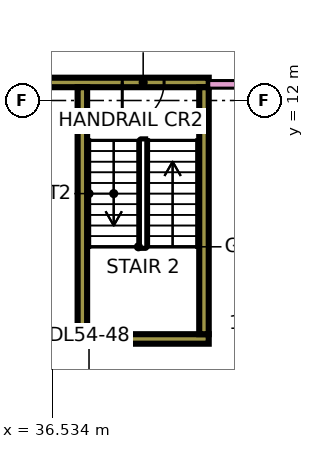
"""IFC4 building model, lengths in metres.
Left out: names, types, materials, properties, quantities, classifications, styles, units other than length and angle.
Written with IfcOpenShell. Run it as: python <this file> out.ifc"""

import sys

from ifc_helpers import new_model, si_unit, direction, frame, frame_2d, origin, place, context, subcontext, project, spatial, rectangle, extrude, element, fill, save


model = new_model("IFC4")
c1 = context("Model", 3, precision=1e-05, world=origin(), true_north=direction((0.0, 1.0)))
c2 = subcontext(c1, "Body", "Model", "MODEL_VIEW")
j1 = project(units=[si_unit("LENGTHUNIT", "METRE"), si_unit("PLANEANGLEUNIT", "RADIAN")], contexts=[c1])
p1 = place(None, origin())
s1 = spatial("IfcSite", under=j1, at=p1, CompositionType="ELEMENT")
p2 = place(p1, origin())
s2 = spatial("IfcBuilding", under=s1, at=p2, CompositionType="ELEMENT")
p3 = place(p2, frame((0.0, 0.0, 230.4)))
s3 = spatial("IfcBuildingStorey", under=s2, at=p3, CompositionType="ELEMENT", Elevation=230.4)
p4 = place(p3, frame((37.2, 5.725, 0.0), z_axis=(0.0, 0.0, 1.0), x_axis=(1.0, 0.0, 0.0)))
e1 = element("IfcWall", 1, at=p4, inside=s3, PredefinedType="SHEAR", context=c2, shape_type="SweptSolid", body=[
    extrude(rectangle(XDim=3.45, YDim=0.25, at=frame_2d((1.725, 0.0))), origin(), (0.0, 0.0, 1.0), 3.75),
])
p5 = place(p3, frame((36.425, 12.475, 0.0), z_axis=(0.0, 0.0, 1.0), x_axis=(1.0, 0.0, 0.0)))
e2 = element("IfcWall", 2, at=p5, inside=s3, PredefinedType="SHEAR", context=c2, shape_type="SweptSolid", body=[
    extrude(rectangle(XDim=4.225, YDim=0.25, at=frame_2d((2.112, 0.0))), origin(), (0.0, 0.0, 1.0), 3.75),
])
p6 = place(p5, frame((1.95, 0.0, 0.0)))
e3 = element("IfcOpeningElement", 3, at=p6, cuts=e2, PredefinedType="OPENING", context=c2, shape_type="SweptSolid", body=[
    extrude(rectangle(XDim=1.1, YDim=2.2, at=frame_2d((0.55, 1.1))), frame((0.0, 0.135, 0.0), z_axis=(0.0, -1.0, 0.0), x_axis=(1.0, 0.0, 0.0)), (0.0, 0.0, 1.0), 0.27),
])
for number, where, z_axis, x_axis in (
    (4, (37.325, 5.85, 0.0), (0.0, 0.0, 1.0), (0.0, 1.0, 0.0)),
    (5, (40.525, 5.85, 0.0), (0.0, 0.0, 1.0), (0.0, 1.0, 0.0)),
):
    element("IfcWall", number, at=place(p3, frame(where, z_axis=z_axis, x_axis=x_axis)), inside=s3, PredefinedType="SHEAR", context=c2, shape_type="SweptSolid", body=[
        extrude(rectangle(XDim=6.5, YDim=0.25, at=frame_2d((3.25, 0.0))), origin(), (0.0, 0.0, 1.0), 3.75),
    ])
p7 = place(p3, frame((40.65, 12.425, 0.0), z_axis=(0.0, 0.0, 1.0), x_axis=(1.0, 0.0, 0.0)))
e6 = element("IfcWall", 6, at=p7, inside=s3, PredefinedType="PARTITIONING", context=c2, shape_type="SweptSolid", body=[
    extrude(rectangle(XDim=22.276, YDim=0.2, at=frame_2d((11.138, 0.0))), origin(), (0.0, 0.0, 1.0), 3.35),
])
p8 = place(p7, frame((14.7, 0.0, 0.0)))
e7 = element("IfcOpeningElement", 7, at=p8, cuts=e6, PredefinedType="OPENING", context=c2, shape_type="SweptSolid", body=[
    extrude(rectangle(XDim=1.0, YDim=2.1, at=frame_2d((0.5, 1.05))), frame((0.0, 0.11, 0.0), z_axis=(0.0, -1.0, 0.0), x_axis=(1.0, 0.0, 0.0)), (0.0, 0.0, 1.0), 0.22),
])
p9 = place(p7, frame((1.05, 0.0, 0.0)))
e8 = element("IfcOpeningElement", 8, at=p9, cuts=e6, PredefinedType="OPENING", context=c2, shape_type="SweptSolid", body=[
    extrude(rectangle(XDim=1.0, YDim=2.1, at=frame_2d((0.5, 1.05))), frame((0.0, 0.11, 0.0), z_axis=(0.0, -1.0, 0.0), x_axis=(1.0, 0.0, 0.0)), (0.0, 0.0, 1.0), 0.22),
])
p10 = place(p6, frame((1.1, 0.0, 0.0), z_axis=(0.0, 0.0, 1.0), x_axis=(-1.0, 0.0, 0.0)))
e9 = element("IfcDoor", 9, at=p10, inside=s3, OperationType="SINGLE_SWING_LEFT", PredefinedType="DOOR", context=c2, shape_type="SweptSolid", body=[
    extrude(rectangle(XDim=1.1, YDim=2.2, at=frame_2d((0.55, 1.1))), frame((0.0, 0.025, 0.0), z_axis=(0.0, -1.0, 0.0), x_axis=(1.0, 0.0, 0.0)), (0.0, 0.0, 1.0), 0.05),
])
fill(e3, e9)
save(model, sys.argv[1])
